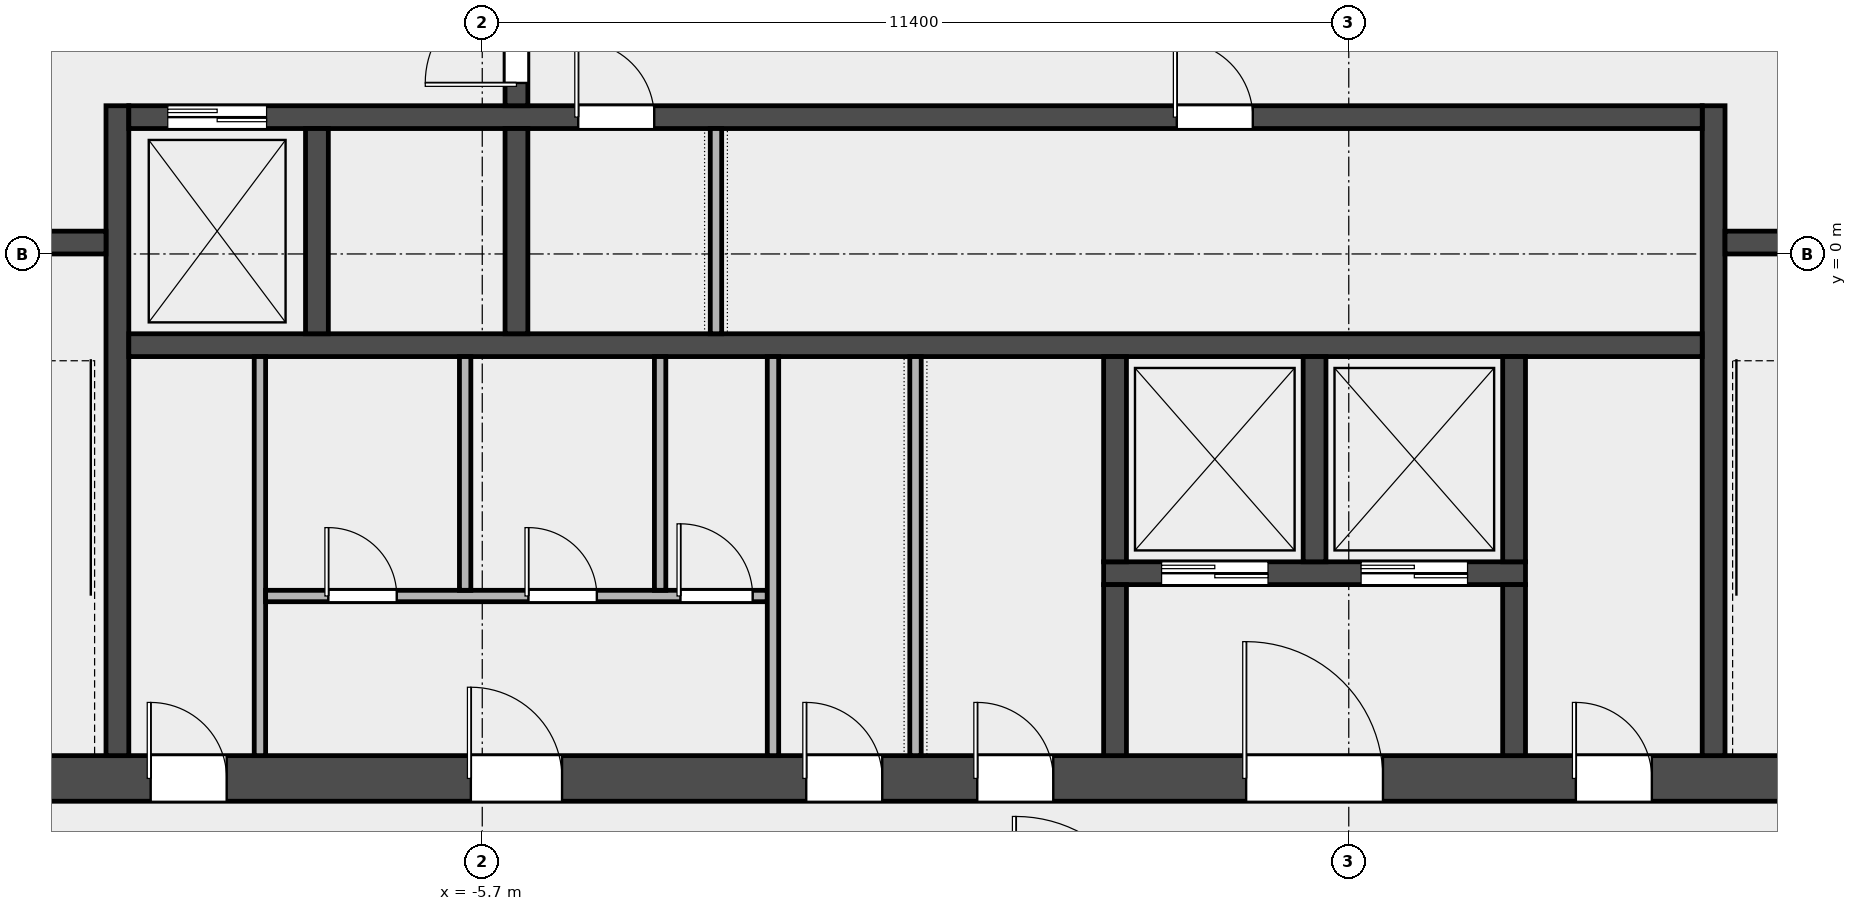
"""IFC4 building model, lengths in metres.
Left out: names, types, materials, properties, quantities, classifications, styles, units other than length and angle.
Written with IfcOpenShell. Run it as: python <this file> out.ifc"""

import sys

from ifc_helpers import new_model, si_unit, direction, frame, frame_2d, origin, place, context, subcontext, project, spatial, rectangle, extrude, element, fill, save


model = new_model("IFC4")
c1 = context("Model", 3, precision=1e-05, world=origin(), true_north=direction((0.0, 1.0)))
c2 = subcontext(c1, "Body", "Model", "MODEL_VIEW")
j1 = project(units=[si_unit("LENGTHUNIT", "METRE"), si_unit("PLANEANGLEUNIT", "RADIAN")], contexts=[c1])
p1 = place(None, origin())
s1 = spatial("IfcSite", under=j1, at=p1, CompositionType="ELEMENT")
p2 = place(p1, origin())
s2 = spatial("IfcBuilding", under=s1, at=p2, CompositionType="ELEMENT")
p3 = place(p2, frame((0.0, 0.0, 235.0)))
s3 = spatial("IfcBuildingStorey", under=s2, at=p3, CompositionType="ELEMENT", Elevation=235.0)
p4 = place(p3, frame((-14.4, -6.9, 0.0), z_axis=(0.0, 0.0, 1.0), x_axis=(1.0, 0.0, 0.0)))
e1 = element("IfcWall", 1, at=p4, inside=s3, PredefinedType="SHEAR", context=c2, shape_type="SweptSolid", body=[
    extrude(rectangle(XDim=28.8, YDim=0.6, at=frame_2d((14.4, 0.0))), origin(), (0.0, 0.0, 1.0), 3.7),
])
p5 = place(p4, frame((4.337, 0.0, 0.0)))
e2 = element("IfcOpeningElement", 2, at=p5, cuts=e1, PredefinedType="OPENING", context=c2, shape_type="SweptSolid", body=[
    extrude(rectangle(XDim=1.0, YDim=2.1, at=frame_2d((0.5, 1.05))), frame((0.0, 0.312, 0.0), z_axis=(0.0, -1.0, 0.0), x_axis=(1.0, 0.0, 0.0)), (0.0, 0.0, 1.0), 0.624),
])
p6 = place(p4, frame((8.55, 0.0, 0.0)))
e3 = element("IfcOpeningElement", 3, at=p6, cuts=e1, PredefinedType="OPENING", context=c2, shape_type="SweptSolid", body=[
    extrude(rectangle(XDim=1.2, YDim=2.1, at=frame_2d((0.6, 1.05))), frame((0.0, 0.312, 0.0), z_axis=(0.0, -1.0, 0.0), x_axis=(1.0, 0.0, 0.0)), (0.0, 0.0, 1.0), 0.624),
])
p7 = place(p4, frame((12.962, 0.0, 0.0)))
e4 = element("IfcOpeningElement", 4, at=p7, cuts=e1, PredefinedType="OPENING", context=c2, shape_type="SweptSolid", body=[
    extrude(rectangle(XDim=1.0, YDim=2.1, at=frame_2d((0.5, 1.05))), frame((0.0, 0.312, 0.0), z_axis=(0.0, -1.0, 0.0), x_axis=(1.0, 0.0, 0.0)), (0.0, 0.0, 1.0), 0.624),
])
p8 = place(p4, frame((15.212, 0.0, 0.0)))
e5 = element("IfcOpeningElement", 5, at=p8, cuts=e1, PredefinedType="OPENING", context=c2, shape_type="SweptSolid", body=[
    extrude(rectangle(XDim=1.0, YDim=2.1, at=frame_2d((0.5, 1.05))), frame((0.0, 0.312, 0.0), z_axis=(0.0, -1.0, 0.0), x_axis=(1.0, 0.0, 0.0)), (0.0, 0.0, 1.0), 0.624),
])
p9 = place(p4, frame((18.75, 0.0, 0.0)))
e6 = element("IfcOpeningElement", 6, at=p9, cuts=e1, PredefinedType="OPENING", context=c2, shape_type="SweptSolid", body=[
    extrude(rectangle(XDim=1.8, YDim=2.1, at=frame_2d((0.9, 1.05))), frame((0.0, 0.312, 0.0), z_axis=(0.0, -1.0, 0.0), x_axis=(1.0, 0.0, 0.0)), (0.0, 0.0, 1.0), 0.624),
])
p10 = place(p4, frame((23.087, 0.0, 0.0)))
e7 = element("IfcOpeningElement", 7, at=p10, cuts=e1, PredefinedType="OPENING", context=c2, shape_type="SweptSolid", body=[
    extrude(rectangle(XDim=1.0, YDim=2.1, at=frame_2d((0.5, 1.05))), frame((0.0, 0.312, 0.0), z_axis=(0.0, -1.0, 0.0), x_axis=(1.0, 0.0, 0.0)), (0.0, 0.0, 1.0), 0.624),
])
for number, where, z_axis, x_axis in (
    (8, (-10.5, -6.6, 0.0), (0.0, 0.0, 1.0), (0.0, 1.0, 0.0)),
    (9, (10.5, -6.6, 0.0), (0.0, 0.0, 1.0), (0.0, 1.0, 0.0)),
):
    element("IfcWall", number, at=place(p3, frame(where, z_axis=z_axis, x_axis=x_axis)), inside=s3, PredefinedType="SHEAR", context=c2, shape_type="SweptSolid", body=[
        extrude(rectangle(XDim=8.55, YDim=0.3, at=frame_2d((4.275, 0.0))), origin(), (0.0, 0.0, 1.0), 3.7),
    ])
p11 = place(p3, frame((-13.8, 0.15, 0.0), z_axis=(0.0, 0.0, 1.0), x_axis=(1.0, 0.0, 0.0)))
e10 = element("IfcWall", 10, at=p11, inside=s3, PredefinedType="SOLIDWALL", context=c2, shape_type="SweptSolid", body=[
    extrude(rectangle(XDim=3.15, YDim=0.3, at=frame_2d((1.575, 0.0))), origin(), (0.0, 0.0, 1.0), 3.7),
])
p12 = place(p11, frame((0.975, 0.0, 0.0)))
e11 = element("IfcOpeningElement", 11, at=p12, cuts=e10, PredefinedType="OPENING", context=c2, shape_type="SweptSolid", body=[
    extrude(rectangle(XDim=1.1, YDim=2.1, at=frame_2d((0.55, 1.05))), frame((0.0, 0.162, 0.0), z_axis=(0.0, -1.0, 0.0), x_axis=(1.0, 0.0, 0.0)), (0.0, 0.0, 1.0), 0.324),
])
p13 = place(p3, frame((10.65, 0.15, 0.0), z_axis=(0.0, 0.0, 1.0), x_axis=(1.0, 0.0, 0.0)))
e12 = element("IfcWall", 12, at=p13, inside=s3, PredefinedType="SOLIDWALL", context=c2, shape_type="SweptSolid", body=[
    extrude(rectangle(XDim=3.15, YDim=0.3, at=frame_2d((1.575, 0.0))), origin(), (0.0, 0.0, 1.0), 3.7),
])
p14 = place(p13, frame((1.025, 0.0, 0.0)))
e13 = element("IfcOpeningElement", 13, at=p14, cuts=e12, PredefinedType="OPENING", context=c2, shape_type="SweptSolid", body=[
    extrude(rectangle(XDim=1.1, YDim=2.1, at=frame_2d((0.55, 1.05))), frame((0.0, 0.162, 0.0), z_axis=(0.0, -1.0, 0.0), x_axis=(1.0, 0.0, 0.0)), (0.0, 0.0, 1.0), 0.324),
])
p15 = place(p3, frame((-10.35, -1.2, 0.0), z_axis=(0.0, 0.0, 1.0), x_axis=(1.0, 0.0, 0.0)))
e14 = element("IfcWall", 14, at=p15, inside=s3, PredefinedType="SOLIDWALL", context=c2, shape_type="SweptSolid", body=[
    extrude(rectangle(XDim=20.7, YDim=0.3, at=frame_2d((10.35, 0.0))), origin(), (0.0, 0.0, 1.0), 3.7),
])
p16 = place(p3, frame((-10.35, 1.8, 0.0), z_axis=(0.0, 0.0, 1.0), x_axis=(1.0, 0.0, 0.0)))
e15 = element("IfcWall", 15, at=p16, inside=s3, PredefinedType="SOLIDWALL", context=c2, shape_type="SweptSolid", body=[
    extrude(rectangle(XDim=20.7, YDim=0.3, at=frame_2d((10.35, 0.0))), origin(), (0.0, 0.0, 1.0), 3.7),
])
p17 = place(p16, frame((0.512, 0.0, 0.0)))
e16 = element("IfcOpeningElement", 16, at=p17, cuts=e15, PredefinedType="OPENING", context=c2, shape_type="SweptSolid", body=[
    extrude(rectangle(XDim=1.3, YDim=2.1, at=frame_2d((0.65, 1.05))), frame((0.0, 0.162, 0.0), z_axis=(0.0, -1.0, 0.0), x_axis=(1.0, 0.0, 0.0)), (0.0, 0.0, 1.0), 0.324),
])
p18 = place(p16, frame((5.913, 0.0, 0.0)))
e17 = element("IfcOpeningElement", 17, at=p18, cuts=e15, PredefinedType="OPENING", context=c2, shape_type="SweptSolid", body=[
    extrude(rectangle(XDim=1.0, YDim=2.1, at=frame_2d((0.5, 1.05))), frame((0.0, 0.162, 0.0), z_axis=(0.0, -1.0, 0.0), x_axis=(1.0, 0.0, 0.0)), (0.0, 0.0, 1.0), 0.324),
])
p19 = place(p16, frame((13.788, 0.0, 0.0)))
e18 = element("IfcOpeningElement", 18, at=p19, cuts=e15, PredefinedType="OPENING", context=c2, shape_type="SweptSolid", body=[
    extrude(rectangle(XDim=1.0, YDim=2.1, at=frame_2d((0.5, 1.05))), frame((0.0, 0.162, 0.0), z_axis=(0.0, -1.0, 0.0), x_axis=(1.0, 0.0, 0.0)), (0.0, 0.0, 1.0), 0.324),
])
for number, where, z_axis, x_axis in (
    (19, (-7.875, -1.05, 0.0), (0.0, 0.0, 1.0), (0.0, 1.0, 0.0)),
    (20, (-5.25, -1.05, 0.0), (0.0, 0.0, 1.0), (0.0, 1.0, 0.0)),
):
    element("IfcWall", number, at=place(p3, frame(where, z_axis=z_axis, x_axis=x_axis)), inside=s3, PredefinedType="SOLIDWALL", context=c2, shape_type="SweptSolid", body=[
        extrude(rectangle(XDim=2.7, YDim=0.3, at=frame_2d((1.35, 0.0))), origin(), (0.0, 0.0, 1.0), 3.7),
    ])
p20 = place(p3, frame((-5.25, 1.95, 0.0), z_axis=(0.0, 0.0, 1.0), x_axis=(0.0, 1.0, 0.0)))
e21 = element("IfcWall", 21, at=p20, inside=s3, PredefinedType="SOLIDWALL", context=c2, shape_type="SweptSolid", body=[
    extrude(rectangle(XDim=3.3, YDim=0.3, at=frame_2d((1.65, 0.0))), origin(), (0.0, 0.0, 1.0), 3.7),
])
p21 = place(p20, frame((0.3, 0.0, 0.0)))
e22 = element("IfcOpeningElement", 22, at=p21, cuts=e21, PredefinedType="OPENING", context=c2, shape_type="SweptSolid", body=[
    extrude(rectangle(XDim=1.2, YDim=2.1, at=frame_2d((0.6, 1.05))), frame((0.0, 0.162, 0.0), z_axis=(0.0, -1.0, 0.0), x_axis=(1.0, 0.0, 0.0)), (0.0, 0.0, 1.0), 0.324),
])
p22 = place(p20, frame((1.8, 0.0, 0.0)))
e23 = element("IfcOpeningElement", 23, at=p22, cuts=e21, PredefinedType="OPENING", context=c2, shape_type="SweptSolid", body=[
    extrude(rectangle(XDim=1.2, YDim=2.1, at=frame_2d((0.6, 1.05))), frame((0.0, 0.162, 0.0), z_axis=(0.0, -1.0, 0.0), x_axis=(1.0, 0.0, 0.0)), (0.0, 0.0, 1.0), 0.324),
])
p23 = place(p3, frame((2.475, -4.2, 0.0), z_axis=(0.0, 0.0, 1.0), x_axis=(1.0, 0.0, 0.0)))
e24 = element("IfcWall", 24, at=p23, inside=s3, PredefinedType="SOLIDWALL", context=c2, shape_type="SweptSolid", body=[
    extrude(rectangle(XDim=5.55, YDim=0.3, at=frame_2d((2.775, 0.0))), origin(), (0.0, 0.0, 1.0), 3.7),
])
p24 = place(p23, frame((0.762, 0.0, 0.0)))
e25 = element("IfcOpeningElement", 25, at=p24, cuts=e24, PredefinedType="OPENING", context=c2, shape_type="SweptSolid", body=[
    extrude(rectangle(XDim=1.4, YDim=2.1, at=frame_2d((0.7, 1.05))), frame((0.0, 0.162, 0.0), z_axis=(0.0, -1.0, 0.0), x_axis=(1.0, 0.0, 0.0)), (0.0, 0.0, 1.0), 0.324),
])
p25 = place(p23, frame((3.387, 0.0, 0.0)))
e26 = element("IfcOpeningElement", 26, at=p25, cuts=e24, PredefinedType="OPENING", context=c2, shape_type="SweptSolid", body=[
    extrude(rectangle(XDim=1.4, YDim=2.1, at=frame_2d((0.7, 1.05))), frame((0.0, 0.162, 0.0), z_axis=(0.0, -1.0, 0.0), x_axis=(1.0, 0.0, 0.0)), (0.0, 0.0, 1.0), 0.324),
])
p26 = place(p3, frame((2.625, -4.05, 0.0), z_axis=(0.0, 0.0, 1.0), x_axis=(0.0, 1.0, 0.0)))
e27 = element("IfcWall", 27, at=p26, inside=s3, PredefinedType="SOLIDWALL", context=c2, shape_type="SweptSolid", body=[
    extrude(rectangle(XDim=2.7, YDim=0.3, at=frame_2d((1.35, 0.0))), origin(), (0.0, 0.0, 1.0), 3.7),
])
p27 = place(p3, frame((2.625, -6.6, 0.0), z_axis=(0.0, 0.0, 1.0), x_axis=(0.0, 1.0, 0.0)))
e28 = element("IfcWall", 28, at=p27, inside=s3, PredefinedType="SOLIDWALL", context=c2, shape_type="SweptSolid", body=[
    extrude(rectangle(XDim=2.25, YDim=0.3, at=frame_2d((1.125, 0.0))), origin(), (0.0, 0.0, 1.0), 3.7),
])
for number, where, z_axis, x_axis in (
    (29, (5.25, -4.05, 0.0), (0.0, 0.0, 1.0), (0.0, 1.0, 0.0)),
    (30, (7.875, -4.05, 0.0), (0.0, 0.0, 1.0), (0.0, 1.0, 0.0)),
):
    element("IfcWall", number, at=place(p3, frame(where, z_axis=z_axis, x_axis=x_axis)), inside=s3, PredefinedType="SOLIDWALL", context=c2, shape_type="SweptSolid", body=[
        extrude(rectangle(XDim=2.7, YDim=0.3, at=frame_2d((1.35, 0.0))), origin(), (0.0, 0.0, 1.0), 3.7),
    ])
p28 = place(p3, frame((7.875, -6.6, 0.0), z_axis=(0.0, 0.0, 1.0), x_axis=(0.0, 1.0, 0.0)))
e31 = element("IfcWall", 31, at=p28, inside=s3, PredefinedType="SOLIDWALL", context=c2, shape_type="SweptSolid", body=[
    extrude(rectangle(XDim=2.25, YDim=0.3, at=frame_2d((1.125, 0.0))), origin(), (0.0, 0.0, 1.0), 3.7),
])
p29 = place(p3, frame((-8.625, -6.6, 0.0), z_axis=(0.0, 0.0, 1.0), x_axis=(0.0, 1.0, 0.0)))
e32 = element("IfcWall", 32, at=p29, inside=s3, PredefinedType="PARTITIONING", context=c2, shape_type="SweptSolid", body=[
    extrude(rectangle(XDim=5.25, YDim=0.15, at=frame_2d((2.625, 0.0))), origin(), (0.0, 0.0, 1.0), 3.7),
])
p30 = place(p3, frame((-8.55, -4.5, 0.0), z_axis=(0.0, 0.0, 1.0), x_axis=(1.0, 0.0, 0.0)))
e33 = element("IfcWall", 33, at=p30, inside=s3, PredefinedType="PARTITIONING", context=c2, shape_type="SweptSolid", body=[
    extrude(rectangle(XDim=6.6, YDim=0.15, at=frame_2d((3.3, 0.0))), origin(), (0.0, 0.0, 1.0), 3.7),
])
p31 = place(p30, frame((0.825, 0.0, 0.0)))
e34 = element("IfcOpeningElement", 34, at=p31, cuts=e33, PredefinedType="OPENING", context=c2, shape_type="SweptSolid", body=[
    extrude(rectangle(XDim=0.9, YDim=2.1, at=frame_2d((0.45, 1.05))), frame((0.0, 0.087, 0.0), z_axis=(0.0, -1.0, 0.0), x_axis=(1.0, 0.0, 0.0)), (0.0, 0.0, 1.0), 0.174),
])
p32 = place(p30, frame((3.458, 0.0, 0.0)))
e35 = element("IfcOpeningElement", 35, at=p32, cuts=e33, PredefinedType="OPENING", context=c2, shape_type="SweptSolid", body=[
    extrude(rectangle(XDim=0.9, YDim=2.1, at=frame_2d((0.45, 1.05))), frame((0.0, 0.087, 0.0), z_axis=(0.0, -1.0, 0.0), x_axis=(1.0, 0.0, 0.0)), (0.0, 0.0, 1.0), 0.174),
])
p33 = place(p30, frame((5.458, 0.0, 0.0)))
e36 = element("IfcOpeningElement", 36, at=p33, cuts=e33, PredefinedType="OPENING", context=c2, shape_type="SweptSolid", body=[
    extrude(rectangle(XDim=0.95, YDim=2.1, at=frame_2d((0.475, 1.05))), frame((0.0, 0.087, 0.0), z_axis=(0.0, -1.0, 0.0), x_axis=(1.0, 0.0, 0.0)), (0.0, 0.0, 1.0), 0.174),
])
for number, where, z_axis, x_axis in (
    (37, (-5.925, -4.425, 0.0), (0.0, 0.0, 1.0), (0.0, 1.0, 0.0)),
    (38, (-3.36, -4.425, 0.0), (0.0, 0.0, 1.0), (0.0, 1.0, 0.0)),
):
    element("IfcWall", number, at=place(p3, frame(where, z_axis=z_axis, x_axis=x_axis)), inside=s3, PredefinedType="PARTITIONING", context=c2, shape_type="SweptSolid", body=[
        extrude(rectangle(XDim=3.075, YDim=0.15, at=frame_2d((1.538, 0.0))), origin(), (0.0, 0.0, 1.0), 3.7),
    ])
for number, where, z_axis, x_axis in (
    (39, (-1.875, -6.6, 0.0), (0.0, 0.0, 1.0), (0.0, 1.0, 0.0)),
    (40, (0.0, -6.6, 0.0), (0.0, 0.0, 1.0), (0.0, 1.0, 0.0)),
):
    element("IfcWall", number, at=place(p3, frame(where, z_axis=z_axis, x_axis=x_axis)), inside=s3, PredefinedType="PARTITIONING", context=c2, shape_type="SweptSolid", body=[
        extrude(rectangle(XDim=5.25, YDim=0.15, at=frame_2d((2.625, 0.0))), origin(), (0.0, 0.0, 1.0), 3.7),
    ])
p34 = place(p3, frame((-2.625, -1.05, 0.0), z_axis=(0.0, 0.0, 1.0), x_axis=(0.0, 1.0, 0.0)))
e41 = element("IfcWall", 41, at=p34, inside=s3, PredefinedType="PARTITIONING", context=c2, shape_type="SweptSolid", body=[
    extrude(rectangle(XDim=2.7, YDim=0.15, at=frame_2d((1.35, 0.0))), origin(), (0.0, 0.0, 1.0), 3.7),
])
p35 = place(p21, origin())
e42 = element("IfcDoor", 42, at=p35, inside=s3, OperationType="SINGLE_SWING_LEFT", PredefinedType="DOOR", context=c2, shape_type="SweptSolid", body=[
    extrude(rectangle(XDim=1.2, YDim=2.1, at=frame_2d((0.6, 1.05))), frame((0.0, 0.025, 0.0), z_axis=(0.0, -1.0, 0.0), x_axis=(1.0, 0.0, 0.0)), (0.0, 0.0, 1.0), 0.05),
])
fill(e22, e42)
p36 = place(p17, origin())
e43 = element("IfcDoor", 43, at=p36, inside=s3, OperationType="DOUBLE_DOOR_SLIDING", PredefinedType="DOOR", context=c2, shape_type="SweptSolid", body=[
    extrude(rectangle(XDim=1.3, YDim=2.1, at=frame_2d((0.65, 1.05))), frame((0.0, 0.025, 0.0), z_axis=(0.0, -1.0, 0.0), x_axis=(1.0, 0.0, 0.0)), (0.0, 0.0, 1.0), 0.05),
])
fill(e16, e43)
p37 = place(p24, origin())
e44 = element("IfcDoor", 44, at=p37, inside=s3, OperationType="DOUBLE_DOOR_SLIDING", PredefinedType="DOOR", context=c2, shape_type="SweptSolid", body=[
    extrude(rectangle(XDim=1.4, YDim=2.1, at=frame_2d((0.7, 1.05))), frame((0.0, 0.025, 0.0), z_axis=(0.0, -1.0, 0.0), x_axis=(1.0, 0.0, 0.0)), (0.0, 0.0, 1.0), 0.05),
])
fill(e25, e44)
p38 = place(p25, origin())
e45 = element("IfcDoor", 45, at=p38, inside=s3, OperationType="DOUBLE_DOOR_SLIDING", PredefinedType="DOOR", context=c2, shape_type="SweptSolid", body=[
    extrude(rectangle(XDim=1.4, YDim=2.1, at=frame_2d((0.7, 1.05))), frame((0.0, 0.025, 0.0), z_axis=(0.0, -1.0, 0.0), x_axis=(1.0, 0.0, 0.0)), (0.0, 0.0, 1.0), 0.05),
])
fill(e26, e45)
p39 = place(p5, origin())
e46 = element("IfcDoor", 46, at=p39, inside=s3, OperationType="SINGLE_SWING_LEFT", PredefinedType="DOOR", context=c2, shape_type="SweptSolid", body=[
    extrude(rectangle(XDim=1.0, YDim=2.1, at=frame_2d((0.5, 1.05))), frame((0.0, 0.025, 0.0), z_axis=(0.0, -1.0, 0.0), x_axis=(1.0, 0.0, 0.0)), (0.0, 0.0, 1.0), 0.05),
])
fill(e2, e46)
p40 = place(p6, origin())
e47 = element("IfcDoor", 47, at=p40, inside=s3, OperationType="SINGLE_SWING_LEFT", PredefinedType="DOOR", context=c2, shape_type="SweptSolid", body=[
    extrude(rectangle(XDim=1.2, YDim=2.1, at=frame_2d((0.6, 1.05))), frame((0.0, 0.025, 0.0), z_axis=(0.0, -1.0, 0.0), x_axis=(1.0, 0.0, 0.0)), (0.0, 0.0, 1.0), 0.05),
])
fill(e3, e47)
p41 = place(p31, origin())
e48 = element("IfcDoor", 48, at=p41, inside=s3, OperationType="SINGLE_SWING_LEFT", PredefinedType="DOOR", context=c2, shape_type="SweptSolid", body=[
    extrude(rectangle(XDim=0.9, YDim=2.1, at=frame_2d((0.45, 1.05))), frame((0.0, 0.025, 0.0), z_axis=(0.0, -1.0, 0.0), x_axis=(1.0, 0.0, 0.0)), (0.0, 0.0, 1.0), 0.05),
])
fill(e34, e48)
p42 = place(p32, origin())
e49 = element("IfcDoor", 49, at=p42, inside=s3, OperationType="SINGLE_SWING_LEFT", PredefinedType="DOOR", context=c2, shape_type="SweptSolid", body=[
    extrude(rectangle(XDim=0.9, YDim=2.1, at=frame_2d((0.45, 1.05))), frame((0.0, 0.025, 0.0), z_axis=(0.0, -1.0, 0.0), x_axis=(1.0, 0.0, 0.0)), (0.0, 0.0, 1.0), 0.05),
])
fill(e35, e49)
p43 = place(p33, origin())
e50 = element("IfcDoor", 50, at=p43, inside=s3, OperationType="SINGLE_SWING_LEFT", PredefinedType="DOOR", context=c2, shape_type="SweptSolid", body=[
    extrude(rectangle(XDim=0.95, YDim=2.1, at=frame_2d((0.475, 1.05))), frame((0.0, 0.025, 0.0), z_axis=(0.0, -1.0, 0.0), x_axis=(1.0, 0.0, 0.0)), (0.0, 0.0, 1.0), 0.05),
])
fill(e36, e50)
p44 = place(p7, origin())
e51 = element("IfcDoor", 51, at=p44, inside=s3, OperationType="SINGLE_SWING_LEFT", PredefinedType="DOOR", context=c2, shape_type="SweptSolid", body=[
    extrude(rectangle(XDim=1.0, YDim=2.1, at=frame_2d((0.5, 1.05))), frame((0.0, 0.025, 0.0), z_axis=(0.0, -1.0, 0.0), x_axis=(1.0, 0.0, 0.0)), (0.0, 0.0, 1.0), 0.05),
])
fill(e4, e51)
p45 = place(p8, origin())
e52 = element("IfcDoor", 52, at=p45, inside=s3, OperationType="SINGLE_SWING_LEFT", PredefinedType="DOOR", context=c2, shape_type="SweptSolid", body=[
    extrude(rectangle(XDim=1.0, YDim=2.1, at=frame_2d((0.5, 1.05))), frame((0.0, 0.025, 0.0), z_axis=(0.0, -1.0, 0.0), x_axis=(1.0, 0.0, 0.0)), (0.0, 0.0, 1.0), 0.05),
])
fill(e5, e52)
p46 = place(p9, origin())
e53 = element("IfcDoor", 53, at=p46, inside=s3, OperationType="DOUBLE_DOOR_SINGLE_SWING", PredefinedType="DOOR", context=c2, shape_type="SweptSolid", body=[
    extrude(rectangle(XDim=1.8, YDim=2.1, at=frame_2d((0.9, 1.05))), frame((0.0, 0.025, 0.0), z_axis=(0.0, -1.0, 0.0), x_axis=(1.0, 0.0, 0.0)), (0.0, 0.0, 1.0), 0.05),
])
fill(e6, e53)
p47 = place(p10, origin())
e54 = element("IfcDoor", 54, at=p47, inside=s3, OperationType="SINGLE_SWING_LEFT", PredefinedType="DOOR", context=c2, shape_type="SweptSolid", body=[
    extrude(rectangle(XDim=1.0, YDim=2.1, at=frame_2d((0.5, 1.05))), frame((0.0, 0.025, 0.0), z_axis=(0.0, -1.0, 0.0), x_axis=(1.0, 0.0, 0.0)), (0.0, 0.0, 1.0), 0.05),
])
fill(e7, e54)
p48 = place(p18, origin())
e55 = element("IfcDoor", 55, at=p48, inside=s3, OperationType="SINGLE_SWING_LEFT", PredefinedType="DOOR", context=c2, shape_type="SweptSolid", body=[
    extrude(rectangle(XDim=1.0, YDim=2.1, at=frame_2d((0.5, 1.05))), frame((0.0, 0.025, 0.0), z_axis=(0.0, -1.0, 0.0), x_axis=(1.0, 0.0, 0.0)), (0.0, 0.0, 1.0), 0.05),
])
fill(e17, e55)
p49 = place(p19, origin())
e56 = element("IfcDoor", 56, at=p49, inside=s3, OperationType="SINGLE_SWING_LEFT", PredefinedType="DOOR", context=c2, shape_type="SweptSolid", body=[
    extrude(rectangle(XDim=1.0, YDim=2.1, at=frame_2d((0.5, 1.05))), frame((0.0, 0.025, 0.0), z_axis=(0.0, -1.0, 0.0), x_axis=(1.0, 0.0, 0.0)), (0.0, 0.0, 1.0), 0.05),
])
fill(e18, e56)
save(model, sys.argv[1])
